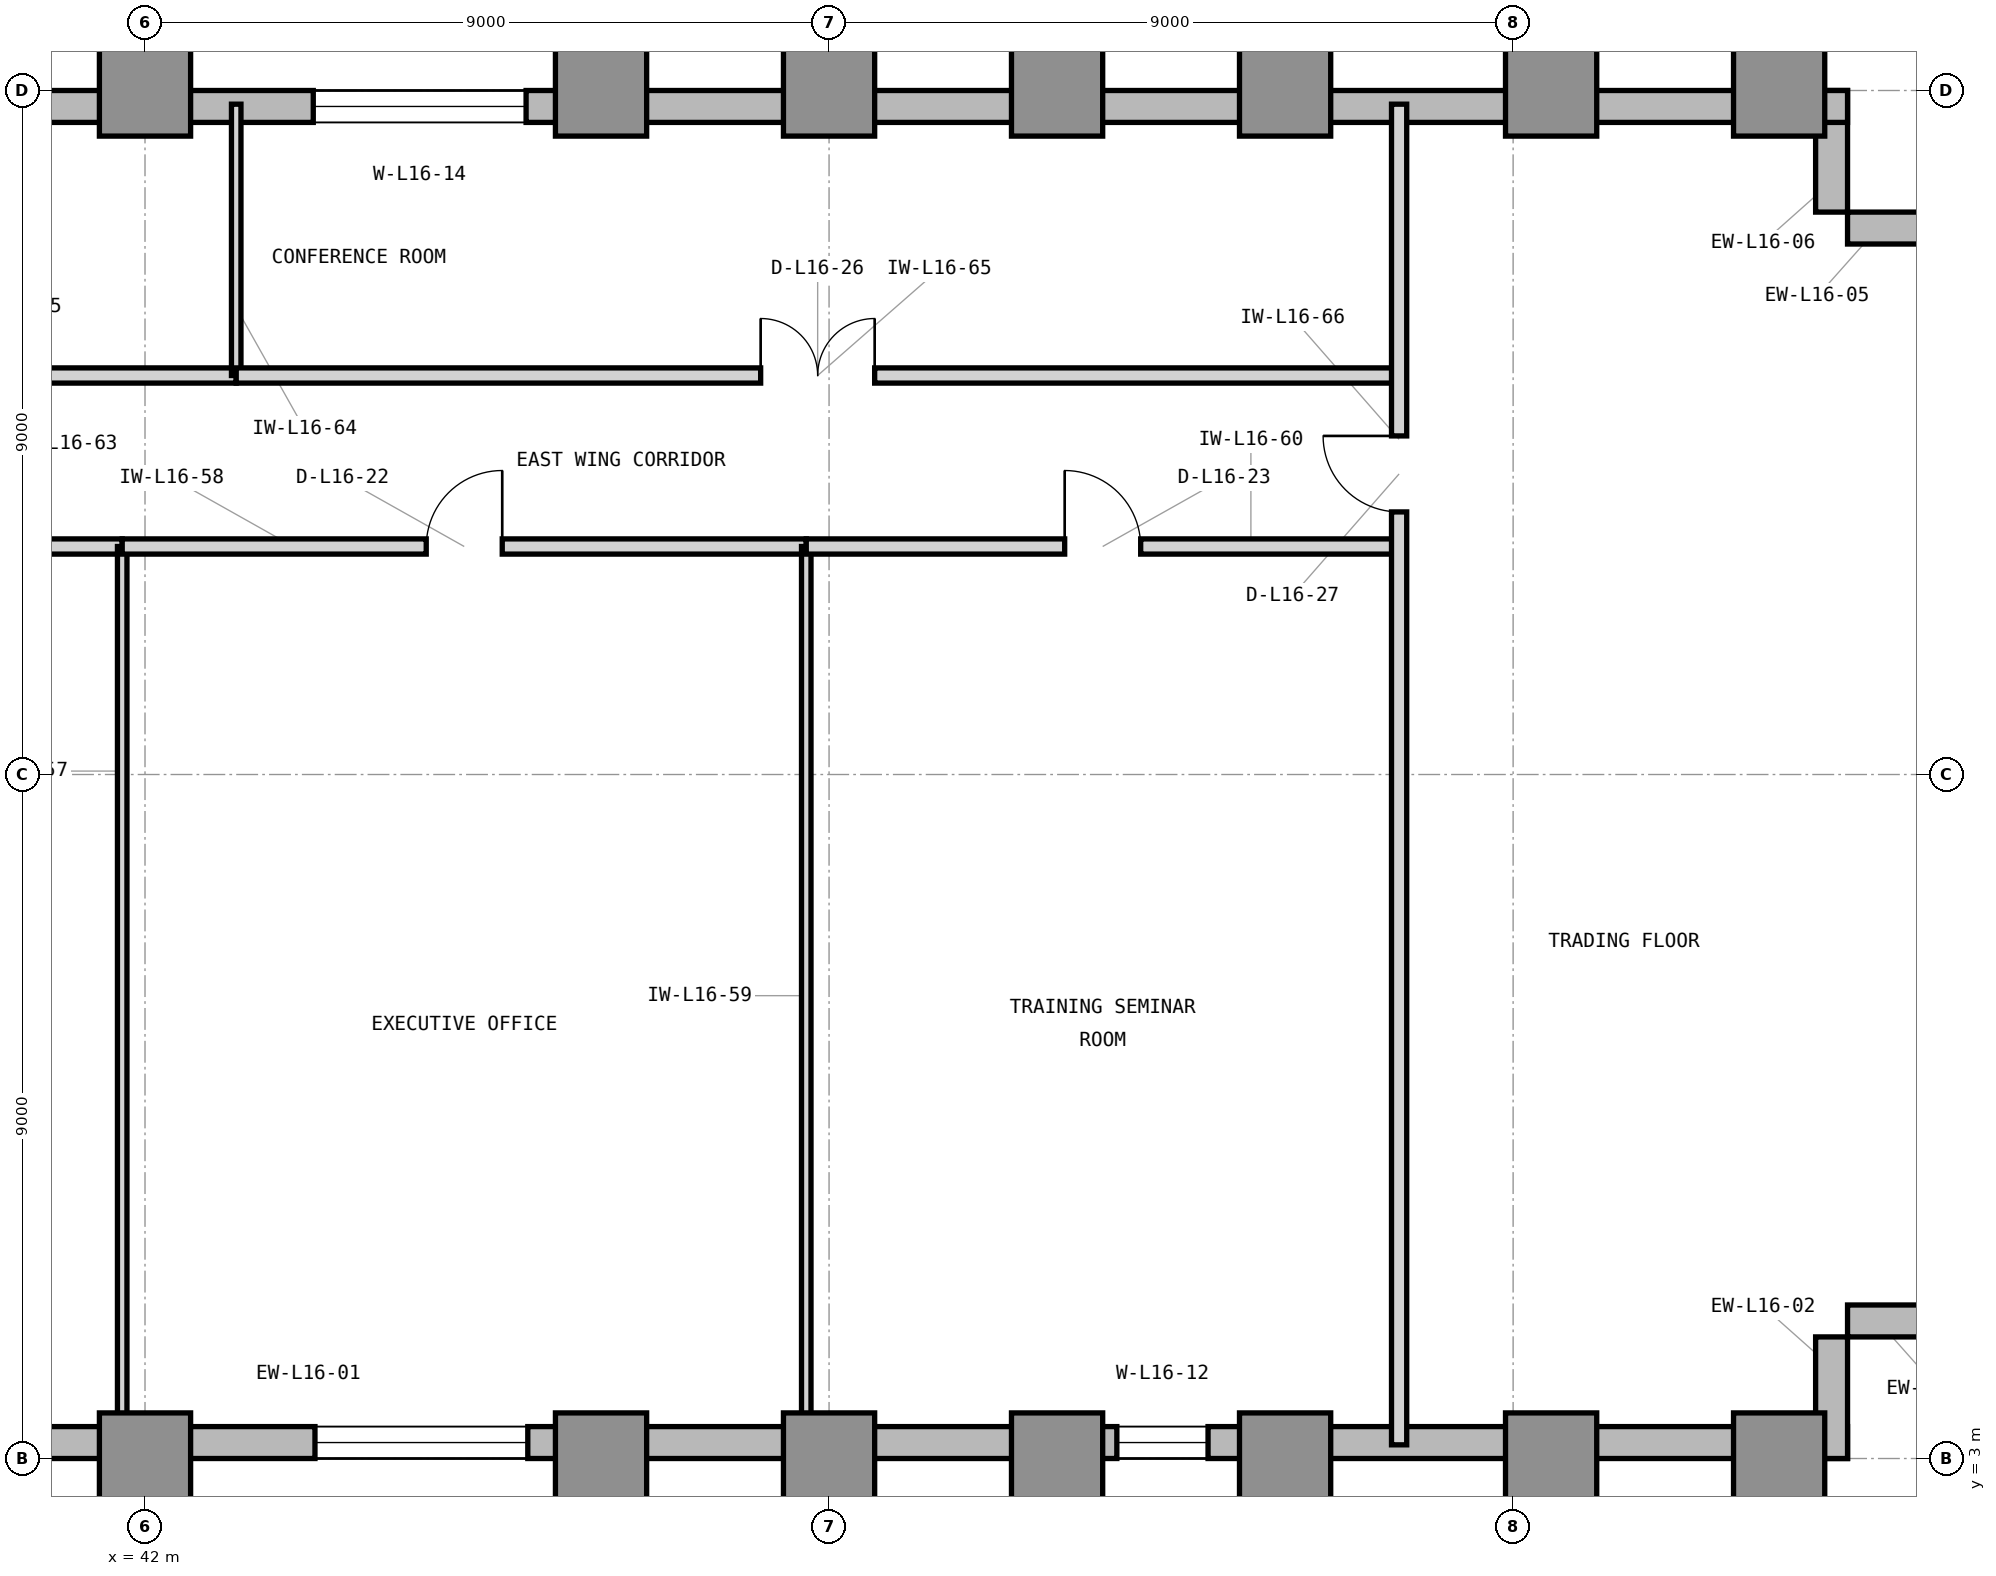
"""IFC4 building model, lengths in metres.
Left out: names, types, materials, properties, quantities, classifications, styles, units other than length and angle.
Written with IfcOpenShell. Run it as: python <this file> out.ifc"""

import sys

from ifc_helpers import new_model, si_unit, direction, frame, frame_2d, origin, origin_2d, place, context, subcontext, project, spatial, rectangle, extrude, element, fill, save


model = new_model("IFC4")
c1 = context("Model", 3, precision=1e-05, world=origin(), true_north=direction((0.0, 1.0)))
c2 = subcontext(c1, "Body", "Model", "MODEL_VIEW")
j1 = project(units=[si_unit("LENGTHUNIT", "METRE"), si_unit("PLANEANGLEUNIT", "RADIAN")], contexts=[c1])
p1 = place(None, origin())
s1 = spatial("IfcSite", under=j1, at=p1, CompositionType="ELEMENT")
p2 = place(p1, origin())
s2 = spatial("IfcBuilding", under=s1, at=p2, CompositionType="ELEMENT")
p3 = place(p2, frame((0.0, 0.0, 72.0)))
s3 = spatial("IfcBuildingStorey", under=s2, at=p3, CompositionType="ELEMENT", Elevation=72.0)
for number, where, z_axis, x_axis in (
    (1, (42.0, 3.0, 0.0), (0.0, 0.0, 1.0), (1.0, 0.0, 0.0)),
    (2, (42.0, 21.0, 0.0), (0.0, 0.0, 1.0), (1.0, 0.0, 0.0)),
    (3, (48.0, 3.0, 0.0), (0.0, 0.0, 1.0), (1.0, 0.0, 0.0)),
    (4, (48.0, 21.0, 0.0), (0.0, 0.0, 1.0), (1.0, 0.0, 0.0)),
    (5, (51.0, 3.0, 0.0), (0.0, 0.0, 1.0), (1.0, 0.0, 0.0)),
    (6, (51.0, 21.0, 0.0), (0.0, 0.0, 1.0), (1.0, 0.0, 0.0)),
    (7, (54.0, 3.0, 0.0), (0.0, 0.0, 1.0), (1.0, 0.0, 0.0)),
    (8, (54.0, 21.0, 0.0), (0.0, 0.0, 1.0), (1.0, 0.0, 0.0)),
    (9, (57.0, 3.0, 0.0), (0.0, 0.0, 1.0), (1.0, 0.0, 0.0)),
    (10, (57.0, 21.0, 0.0), (0.0, 0.0, 1.0), (1.0, 0.0, 0.0)),
    (11, (60.5, 3.0, 0.0), (0.0, 0.0, 1.0), (1.0, 0.0, 0.0)),
    (12, (60.5, 21.0, 0.0), (0.0, 0.0, 1.0), (1.0, 0.0, 0.0)),
    (13, (63.5, 3.0, 0.0), (0.0, 0.0, 1.0), (1.0, 0.0, 0.0)),
    (14, (63.5, 21.0, 0.0), (0.0, 0.0, 1.0), (1.0, 0.0, 0.0)),
):
    element("IfcColumn", number, at=place(p3, frame(where, z_axis=z_axis, x_axis=x_axis)), inside=s3, PredefinedType="COLUMN", context=c2, shape_type="SweptSolid", body=[
        extrude(rectangle(XDim=1.2, YDim=1.2, at=origin_2d()), origin(), (0.0, 0.0, 1.0), 4.2),
    ])
p4 = place(p3, frame((23.9, 3.21, 0.0), z_axis=(0.0, 0.0, 1.0), x_axis=(1.0, 0.0, 0.0)))
e15 = element("IfcWall", 15, at=p4, inside=s3, PredefinedType="STANDARD", context=c2, shape_type="SweptSolid", body=[
    extrude(rectangle(XDim=40.5, YDim=0.42, at=frame_2d((20.25, 0.0))), origin(), (0.0, 0.0, 1.0), 3.98),
])
p5 = place(p4, frame((1.1, 0.0, 0.85)))
e16 = element("IfcOpeningElement", 16, at=p5, cuts=e15, PredefinedType="OPENING", context=c2, shape_type="SweptSolid", body=[
    extrude(rectangle(XDim=1.2, YDim=2.45, at=frame_2d((0.6, 1.225))), frame((0.0, 0.22, 0.0), z_axis=(0.0, -1.0, 0.0), x_axis=(1.0, 0.0, 0.0)), (0.0, 0.0, 1.0), 0.44),
])
p6 = place(p4, frame((5.136, 0.0, 0.85)))
e17 = element("IfcOpeningElement", 17, at=p6, cuts=e15, PredefinedType="OPENING", context=c2, shape_type="SweptSolid", body=[
    extrude(rectangle(XDim=2.8, YDim=2.45, at=frame_2d((1.4, 1.225))), frame((0.0, 0.22, 0.0), z_axis=(0.0, -1.0, 0.0), x_axis=(1.0, 0.0, 0.0)), (0.0, 0.0, 1.0), 0.44),
])
p7 = place(p4, frame((12.636, 0.0, 0.85)))
e18 = element("IfcOpeningElement", 18, at=p7, cuts=e15, PredefinedType="OPENING", context=c2, shape_type="SweptSolid", body=[
    extrude(rectangle(XDim=2.8, YDim=2.45, at=frame_2d((1.4, 1.225))), frame((0.0, 0.22, 0.0), z_axis=(0.0, -1.0, 0.0), x_axis=(1.0, 0.0, 0.0)), (0.0, 0.0, 1.0), 0.44),
])
p8 = place(p4, frame((20.336, 0.0, 0.85)))
e19 = element("IfcOpeningElement", 19, at=p8, cuts=e15, PredefinedType="OPENING", context=c2, shape_type="SweptSolid", body=[
    extrude(rectangle(XDim=2.8, YDim=2.45, at=frame_2d((1.4, 1.225))), frame((0.0, 0.22, 0.0), z_axis=(0.0, -1.0, 0.0), x_axis=(1.0, 0.0, 0.0)), (0.0, 0.0, 1.0), 0.44),
])
p9 = place(p4, frame((30.886, 0.0, 0.85)))
e20 = element("IfcOpeningElement", 20, at=p9, cuts=e15, PredefinedType="OPENING", context=c2, shape_type="SweptSolid", body=[
    extrude(rectangle(XDim=1.2, YDim=2.45, at=frame_2d((0.6, 1.225))), frame((0.0, 0.22, 0.0), z_axis=(0.0, -1.0, 0.0), x_axis=(1.0, 0.0, 0.0)), (0.0, 0.0, 1.0), 0.44),
])
for number, where, z_axis, x_axis in (
    (21, (64.19, 3.0, 0.0), (0.0, 0.0, 1.0), (0.0, 1.0, 0.0)),
    (22, (64.4, 4.81, 0.0), (0.0, 0.0, 1.0), (1.0, 0.0, 0.0)),
    (23, (66.0, 19.19, 0.0), (0.0, 0.0, 1.0), (-1.0, 0.0, 0.0)),
    (24, (64.19, 19.4, 0.0), (0.0, 0.0, 1.0), (0.0, 1.0, 0.0)),
):
    element("IfcWall", number, at=place(p3, frame(where, z_axis=z_axis, x_axis=x_axis)), inside=s3, PredefinedType="STANDARD", context=c2, shape_type="SweptSolid", body=[
        extrude(rectangle(XDim=1.6, YDim=0.42, at=frame_2d((0.8, 0.0))), origin(), (0.0, 0.0, 1.0), 3.98),
    ])
p10 = place(p3, frame((64.4, 20.79, 0.0), z_axis=(0.0, 0.0, 1.0), x_axis=(-1.0, 0.0, 0.0)))
e25 = element("IfcWall", 25, at=p10, inside=s3, PredefinedType="STANDARD", context=c2, shape_type="SweptSolid", body=[
    extrude(rectangle(XDim=40.4, YDim=0.42, at=frame_2d((20.2, 0.0))), origin(), (0.0, 0.0, 1.0), 3.98),
])
p11 = place(p10, frame((26.375, 0.0, 0.85)))
e26 = element("IfcOpeningElement", 26, at=p11, cuts=e25, PredefinedType="OPENING", context=c2, shape_type="SweptSolid", body=[
    extrude(rectangle(XDim=2.8, YDim=2.45, at=frame_2d((1.4, 1.225))), frame((0.0, 0.22, 0.0), z_axis=(0.0, -1.0, 0.0), x_axis=(1.0, 0.0, 0.0)), (0.0, 0.0, 1.0), 0.44),
])
p12 = place(p10, frame((38.222, 0.0, 0.85)))
e27 = element("IfcOpeningElement", 27, at=p12, cuts=e25, PredefinedType="OPENING", context=c2, shape_type="SweptSolid", body=[
    extrude(rectangle(XDim=1.2, YDim=2.45, at=frame_2d((0.6, 1.225))), frame((0.0, 0.22, 0.0), z_axis=(0.0, -1.0, 0.0), x_axis=(1.0, 0.0, 0.0)), (0.0, 0.0, 1.0), 0.44),
])
p13 = place(p10, frame((32.536, 0.0, 0.85)))
e28 = element("IfcOpeningElement", 28, at=p13, cuts=e25, PredefinedType="OPENING", context=c2, shape_type="SweptSolid", body=[
    extrude(rectangle(XDim=2.8, YDim=2.45, at=frame_2d((1.4, 1.225))), frame((0.0, 0.22, 0.0), z_axis=(0.0, -1.0, 0.0), x_axis=(1.0, 0.0, 0.0)), (0.0, 0.0, 1.0), 0.44),
])
p14 = place(p10, frame((17.386, 0.0, 0.85)))
e29 = element("IfcOpeningElement", 29, at=p14, cuts=e25, PredefinedType="OPENING", context=c2, shape_type="SweptSolid", body=[
    extrude(rectangle(XDim=2.8, YDim=2.45, at=frame_2d((1.4, 1.225))), frame((0.0, 0.22, 0.0), z_axis=(0.0, -1.0, 0.0), x_axis=(1.0, 0.0, 0.0)), (0.0, 0.0, 1.0), 0.44),
])
p15 = place(p3, frame((34.2, 15.0, 0.0), z_axis=(0.0, 0.0, 1.0), x_axis=(1.0, 0.0, 0.0)))
e30 = element("IfcWall", 30, at=p15, inside=s3, PredefinedType="PARTITIONING", context=c2, shape_type="SweptSolid", body=[
    extrude(rectangle(XDim=7.5, YDim=0.2, at=frame_2d((3.75, 0.0))), origin(), (0.0, 0.0, 1.0), 3.426),
])
p16 = place(p15, frame((3.25, 0.0, 0.0)))
e31 = element("IfcOpeningElement", 31, at=p16, cuts=e30, PredefinedType="OPENING", context=c2, shape_type="SweptSolid", body=[
    extrude(rectangle(XDim=1.0, YDim=2.15, at=frame_2d((0.5, 1.075))), frame((0.0, 0.11, 0.0), z_axis=(0.0, -1.0, 0.0), x_axis=(1.0, 0.0, 0.0)), (0.0, 0.0, 1.0), 0.22),
])
p17 = place(p3, frame((41.7, 3.18, 0.0), z_axis=(0.0, 0.0, 1.0), x_axis=(0.0, 1.0, 0.0)))
e32 = element("IfcWall", 32, at=p17, inside=s3, PredefinedType="PARTITIONING", context=c2, shape_type="SweptSolid", body=[
    extrude(rectangle(XDim=11.82, YDim=0.125, at=frame_2d((5.91, 0.0))), origin(), (0.0, 0.0, 1.0), 3.97),
])
p18 = place(p3, frame((41.7, 15.0, 0.0), z_axis=(0.0, 0.0, 1.0), x_axis=(1.0, 0.0, 0.0)))
e33 = element("IfcWall", 33, at=p18, inside=s3, PredefinedType="PARTITIONING", context=c2, shape_type="SweptSolid", body=[
    extrude(rectangle(XDim=9.0, YDim=0.2, at=frame_2d((4.5, 0.0))), origin(), (0.0, 0.0, 1.0), 3.426),
])
p19 = place(p18, frame((4.0, 0.0, 0.0)))
e34 = element("IfcOpeningElement", 34, at=p19, cuts=e33, PredefinedType="OPENING", context=c2, shape_type="SweptSolid", body=[
    extrude(rectangle(XDim=1.0, YDim=2.15, at=frame_2d((0.5, 1.075))), frame((0.0, 0.11, 0.0), z_axis=(0.0, -1.0, 0.0), x_axis=(1.0, 0.0, 0.0)), (0.0, 0.0, 1.0), 0.22),
])
p20 = place(p3, frame((50.7, 3.18, 0.0), z_axis=(0.0, 0.0, 1.0), x_axis=(0.0, 1.0, 0.0)))
e35 = element("IfcWall", 35, at=p20, inside=s3, PredefinedType="PARTITIONING", context=c2, shape_type="SweptSolid", body=[
    extrude(rectangle(XDim=11.82, YDim=0.125, at=frame_2d((5.91, 0.0))), origin(), (0.0, 0.0, 1.0), 3.97),
])
p21 = place(p3, frame((50.7, 15.0, 0.0), z_axis=(0.0, 0.0, 1.0), x_axis=(1.0, 0.0, 0.0)))
e36 = element("IfcWall", 36, at=p21, inside=s3, PredefinedType="PARTITIONING", context=c2, shape_type="SweptSolid", body=[
    extrude(rectangle(XDim=7.8, YDim=0.2, at=frame_2d((3.9, 0.0))), origin(), (0.0, 0.0, 1.0), 3.426),
])
p22 = place(p21, frame((3.4, 0.0, 0.0)))
e37 = element("IfcOpeningElement", 37, at=p22, cuts=e36, PredefinedType="OPENING", context=c2, shape_type="SweptSolid", body=[
    extrude(rectangle(XDim=1.0, YDim=2.15, at=frame_2d((0.5, 1.075))), frame((0.0, 0.11, 0.0), z_axis=(0.0, -1.0, 0.0), x_axis=(1.0, 0.0, 0.0)), (0.0, 0.0, 1.0), 0.22),
])
p23 = place(p3, frame((34.2, 17.25, 0.0), z_axis=(0.0, 0.0, 1.0), x_axis=(1.0, 0.0, 0.0)))
e38 = element("IfcWall", 38, at=p23, inside=s3, PredefinedType="PARTITIONING", context=c2, shape_type="SweptSolid", body=[
    extrude(rectangle(XDim=9.0, YDim=0.2, at=frame_2d((4.5, 0.0))), origin(), (0.0, 0.0, 1.0), 3.97),
])
p24 = place(p23, frame((4.0, 0.0, 0.0)))
e39 = element("IfcOpeningElement", 39, at=p24, cuts=e38, PredefinedType="OPENING", context=c2, shape_type="SweptSolid", body=[
    extrude(rectangle(XDim=1.0, YDim=2.15, at=frame_2d((0.5, 1.075))), frame((0.0, 0.11, 0.0), z_axis=(0.0, -1.0, 0.0), x_axis=(1.0, 0.0, 0.0)), (0.0, 0.0, 1.0), 0.22),
])
p25 = place(p3, frame((43.2, 17.25, 0.0), z_axis=(0.0, 0.0, 1.0), x_axis=(0.0, 1.0, 0.0)))
e40 = element("IfcWall", 40, at=p25, inside=s3, PredefinedType="PARTITIONING", context=c2, shape_type="SweptSolid", body=[
    extrude(rectangle(XDim=3.57, YDim=0.125, at=frame_2d((1.785, 0.0))), origin(), (0.0, 0.0, 1.0), 3.97),
])
p26 = place(p3, frame((43.2, 17.25, 0.0), z_axis=(0.0, 0.0, 1.0), x_axis=(1.0, 0.0, 0.0)))
e41 = element("IfcWall", 41, at=p26, inside=s3, PredefinedType="PARTITIONING", context=c2, shape_type="SweptSolid", body=[
    extrude(rectangle(XDim=15.3, YDim=0.2, at=frame_2d((7.65, 0.0))), origin(), (0.0, 0.0, 1.0), 3.97),
])
p27 = place(p26, frame((6.9, 0.0, 0.0)))
e42 = element("IfcOpeningElement", 42, at=p27, cuts=e41, PredefinedType="OPENING", context=c2, shape_type="SweptSolid", body=[
    extrude(rectangle(XDim=1.5, YDim=2.3, at=frame_2d((0.75, 1.15))), frame((0.0, 0.11, 0.0), z_axis=(0.0, -1.0, 0.0), x_axis=(1.0, 0.0, 0.0)), (0.0, 0.0, 1.0), 0.22),
])
p28 = place(p3, frame((58.5, 3.18, 0.0), z_axis=(0.0, 0.0, 1.0), x_axis=(0.0, 1.0, 0.0)))
e43 = element("IfcWall", 43, at=p28, inside=s3, PredefinedType="PARTITIONING", context=c2, shape_type="SweptSolid", body=[
    extrude(rectangle(XDim=17.64, YDim=0.2, at=frame_2d((8.82, 0.0))), origin(), (0.0, 0.0, 1.0), 3.97),
])
p29 = place(p28, frame((12.275, 0.0, 0.0)))
e44 = element("IfcOpeningElement", 44, at=p29, cuts=e43, PredefinedType="OPENING", context=c2, shape_type="SweptSolid", body=[
    extrude(rectangle(XDim=1.0, YDim=2.15, at=frame_2d((0.5, 1.075))), frame((0.0, 0.11, 0.0), z_axis=(0.0, -1.0, 0.0), x_axis=(1.0, 0.0, 0.0)), (0.0, 0.0, 1.0), 0.22),
])
p30 = place(p19, origin())
e45 = element("IfcDoor", 45, at=p30, inside=s3, OperationType="SINGLE_SWING_RIGHT", PredefinedType="DOOR", context=c2, shape_type="SweptSolid", body=[
    extrude(rectangle(XDim=1.0, YDim=2.15, at=frame_2d((0.5, 1.075))), frame((0.0, 0.025, 0.0), z_axis=(0.0, -1.0, 0.0), x_axis=(1.0, 0.0, 0.0)), (0.0, 0.0, 1.0), 0.05),
])
fill(e34, e45)
p31 = place(p22, origin())
e46 = element("IfcDoor", 46, at=p31, inside=s3, OperationType="SINGLE_SWING_LEFT", PredefinedType="DOOR", context=c2, shape_type="SweptSolid", body=[
    extrude(rectangle(XDim=1.0, YDim=2.15, at=frame_2d((0.5, 1.075))), frame((0.0, 0.025, 0.0), z_axis=(0.0, -1.0, 0.0), x_axis=(1.0, 0.0, 0.0)), (0.0, 0.0, 1.0), 0.05),
])
fill(e37, e46)
p32 = place(p27, origin())
e47 = element("IfcDoor", 47, at=p32, inside=s3, OperationType="DOUBLE_DOOR_SINGLE_SWING", PredefinedType="DOOR", context=c2, shape_type="SweptSolid", body=[
    extrude(rectangle(XDim=1.5, YDim=2.3, at=frame_2d((0.75, 1.15))), frame((0.0, 0.025, 0.0), z_axis=(0.0, -1.0, 0.0), x_axis=(1.0, 0.0, 0.0)), (0.0, 0.0, 1.0), 0.05),
])
fill(e42, e47)
p33 = place(p29, origin())
e48 = element("IfcDoor", 48, at=p33, inside=s3, OperationType="SINGLE_SWING_RIGHT", PredefinedType="DOOR", context=c2, shape_type="SweptSolid", body=[
    extrude(rectangle(XDim=1.0, YDim=2.15, at=frame_2d((0.5, 1.075))), frame((0.0, 0.025, 0.0), z_axis=(0.0, -1.0, 0.0), x_axis=(1.0, 0.0, 0.0)), (0.0, 0.0, 1.0), 0.05),
])
fill(e44, e48)
p34 = place(p8, origin())
e49 = element("IfcWindow", 49, at=p34, inside=s3, PartitioningType="SINGLE_PANEL", PredefinedType="WINDOW", context=c2, shape_type="SweptSolid", body=[
    extrude(rectangle(XDim=2.8, YDim=2.45, at=frame_2d((1.4, 1.225))), frame((0.0, 0.11, 0.0), z_axis=(0.0, -1.0, 0.0), x_axis=(1.0, 0.0, 0.0)), (0.0, 0.0, 1.0), 0.06),
])
fill(e19, e49)
p35 = place(p9, origin())
e50 = element("IfcWindow", 50, at=p35, inside=s3, PartitioningType="SINGLE_PANEL", PredefinedType="WINDOW", context=c2, shape_type="SweptSolid", body=[
    extrude(rectangle(XDim=1.2, YDim=2.45, at=frame_2d((0.6, 1.225))), frame((0.0, 0.11, 0.0), z_axis=(0.0, -1.0, 0.0), x_axis=(1.0, 0.0, 0.0)), (0.0, 0.0, 1.0), 0.06),
])
fill(e20, e50)
p36 = place(p14, origin())
e51 = element("IfcWindow", 51, at=p36, inside=s3, PartitioningType="SINGLE_PANEL", PredefinedType="WINDOW", context=c2, shape_type="SweptSolid", body=[
    extrude(rectangle(XDim=2.8, YDim=2.45, at=frame_2d((1.4, 1.225))), frame((0.0, 0.11, 0.0), z_axis=(0.0, -1.0, 0.0), x_axis=(1.0, 0.0, 0.0)), (0.0, 0.0, 1.0), 0.06),
])
fill(e29, e51)
save(model, sys.argv[1])
